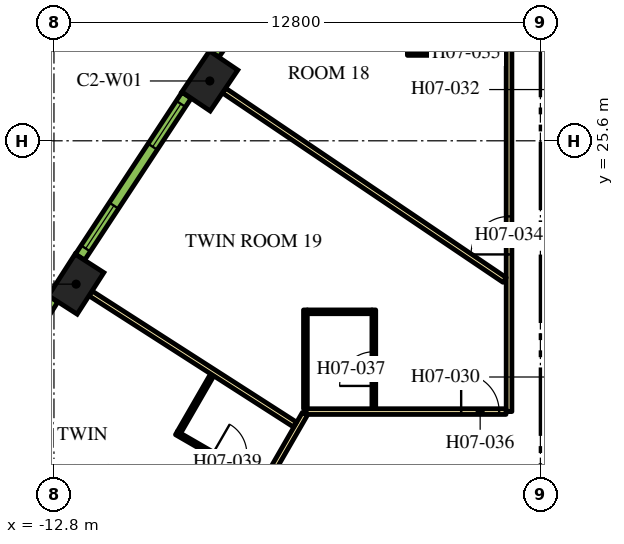
"""IFC4 building model, lengths in metres.
Left out: names, types, materials, properties, quantities, classifications, styles, units other than length and angle.
Written with IfcOpenShell. Run it as: python <this file> out.ifc"""

import sys

from ifc_helpers import new_model, si_unit, direction, frame, frame_2d, origin, origin_2d, place, context, subcontext, project, spatial, rectangle, extrude, element, fill, save


model = new_model("IFC4")
c1 = context("Model", 3, precision=1e-05, world=origin(), true_north=direction((0.0, 1.0)))
c2 = subcontext(c1, "Body", "Model", "MODEL_VIEW")
j1 = project(units=[si_unit("LENGTHUNIT", "METRE"), si_unit("PLANEANGLEUNIT", "RADIAN")], contexts=[c1])
p1 = place(None, origin())
s1 = spatial("IfcSite", under=j1, at=p1, CompositionType="ELEMENT")
p2 = place(p1, origin())
s2 = spatial("IfcBuilding", under=s1, at=p2, CompositionType="ELEMENT")
p3 = place(p2, frame((0.0, 0.0, 95.4)))
s3 = spatial("IfcBuildingStorey", under=s2, at=p3, CompositionType="ELEMENT", Elevation=95.4)
for number, where, z_axis, x_axis in (
    (1, (-8.699, 27.174, 0.0), (0.0, 0.0, 1.0), (-0.559, -0.829, 0.0)),
    (2, (-12.217, 21.828, 0.0), (0.0, 0.0, 1.0), (-0.54, -0.842, 0.0)),
):
    element("IfcColumn", number, at=place(p3, frame(where, z_axis=z_axis, x_axis=x_axis)), inside=s3, PredefinedType="COLUMN", context=c2, shape_type="SweptSolid", body=[
        extrude(rectangle(XDim=1.3, YDim=0.9, at=origin_2d()), origin(), (0.0, 0.0, 1.0), 3.9),
    ])
p4 = place(p3, frame((-0.825, 18.475, 0.0), z_axis=(0.0, 0.0, 1.0), x_axis=(0.0, 1.0, 0.0)))
e3 = element("IfcWall", 3, at=p4, inside=s3, PredefinedType="PARTITIONING", context=c2, shape_type="SweptSolid", body=[
    extrude(rectangle(XDim=13.623, YDim=0.15, at=frame_2d((6.812, 0.0))), origin(), (0.0, 0.0, 1.0), 2.75),
])
p5 = place(p4, frame((4.135, 0.0, 0.0)))
e4 = element("IfcOpeningElement", 4, at=p5, cuts=e3, PredefinedType="OPENING", context=c2, shape_type="SweptSolid", body=[
    extrude(rectangle(XDim=1.0, YDim=2.1, at=frame_2d((0.5, 1.05))), frame((0.0, 0.085, 0.0), z_axis=(0.0, -1.0, 0.0), x_axis=(1.0, 0.0, 0.0)), (0.0, 0.0, 1.0), 0.17),
])
p6 = place(p3, frame((-6.163, 18.475, 0.0), z_axis=(0.0, 0.0, 1.0), x_axis=(1.0, 0.0, 0.0)))
e5 = element("IfcWall", 5, at=p6, inside=s3, PredefinedType="PARTITIONING", context=c2, shape_type="SweptSolid", body=[
    extrude(rectangle(XDim=5.258, YDim=0.15, at=frame_2d((2.629, 0.0))), origin(), (0.0, 0.0, 1.0), 2.75),
])
p7 = place(p6, frame((4.078, 0.0, 0.0)))
e6 = element("IfcOpeningElement", 6, at=p7, cuts=e5, PredefinedType="OPENING", context=c2, shape_type="SweptSolid", body=[
    extrude(rectangle(XDim=1.0, YDim=2.1, at=frame_2d((0.5, 1.05))), frame((0.0, 0.085, 0.0), z_axis=(0.0, -1.0, 0.0), x_axis=(1.0, 0.0, 0.0)), (0.0, 0.0, 1.0), 0.17),
])
p8 = place(p3, frame((-19.081, -3.9, 0.0), z_axis=(0.0, 0.0, 1.0), x_axis=(0.499998313975, 0.866026377209, 0.0)))
e7 = element("IfcWall", 7, at=p8, inside=s3, PredefinedType="PARTITIONING", context=c2, shape_type="SweptSolid", body=[
    extrude(rectangle(XDim=25.766, YDim=0.15, at=frame_2d((12.883, 0.0))), origin(), (0.0, 0.0, 1.0), 2.75),
])
p9 = place(p8, frame((19.306, 0.0, 0.0)))
e8 = element("IfcOpeningElement", 8, at=p9, cuts=e7, PredefinedType="OPENING", context=c2, shape_type="SweptSolid", body=[
    extrude(rectangle(XDim=1.0, YDim=2.1, at=frame_2d((0.5, 1.05))), frame((0.0, 0.085, 0.0), z_axis=(0.0, -1.0, 0.0), x_axis=(1.0, 0.0, 0.0)), (0.0, 0.0, 1.0), 0.17),
])
p10 = place(p8, frame((17.144, 0.0, 0.0)))
e9 = element("IfcOpeningElement", 9, at=p10, cuts=e7, PredefinedType="OPENING", context=c2, shape_type="SweptSolid", body=[
    extrude(rectangle(XDim=0.9, YDim=2.1, at=frame_2d((0.45, 1.05))), frame((0.0, 0.085, 0.0), z_axis=(0.0, -1.0, 0.0), x_axis=(1.0, 0.0, 0.0)), (0.0, 0.0, 1.0), 0.17),
])
p11 = place(p8, frame((9.955, 0.0, 0.0)))
e10 = element("IfcOpeningElement", 10, at=p11, cuts=e7, PredefinedType="OPENING", context=c2, shape_type="SweptSolid", body=[
    extrude(rectangle(XDim=1.1, YDim=2.1, at=frame_2d((0.55, 1.05))), frame((0.0, 0.085, 0.0), z_axis=(0.0, -1.0, 0.0), x_axis=(1.0, 0.0, 0.0)), (0.0, 0.0, 1.0), 0.17),
])
p12 = place(p8, frame((8.648, 0.0, 0.0)))
e11 = element("IfcOpeningElement", 11, at=p12, cuts=e7, PredefinedType="OPENING", context=c2, shape_type="SweptSolid", body=[
    extrude(rectangle(XDim=1.0, YDim=2.1, at=frame_2d((0.5, 1.05))), frame((0.0, 0.085, 0.0), z_axis=(0.0, -1.0, 0.0), x_axis=(1.0, 0.0, 0.0)), (0.0, 0.0, 1.0), 0.17),
])
p13 = place(p8, frame((1.553, 0.0, 0.0)))
e12 = element("IfcOpeningElement", 12, at=p13, cuts=e7, PredefinedType="OPENING", context=c2, shape_type="SweptSolid", body=[
    extrude(rectangle(XDim=0.9, YDim=2.1, at=frame_2d((0.45, 1.05))), frame((0.0, 0.085, 0.0), z_axis=(0.0, -1.0, 0.0), x_axis=(1.0, 0.0, 0.0)), (0.0, 0.0, 1.0), 0.17),
])
p14 = place(p3, frame((-11.838, 21.585, 0.0), z_axis=(0.0, 0.0, 1.0), x_axis=(0.841699322813, -0.539946525108, 0.0)))
e13 = element("IfcWall", 13, at=p14, inside=s3, PredefinedType="PARTITIONING", context=c2, shape_type="SweptSolid", body=[
    extrude(rectangle(XDim=6.392, YDim=0.15, at=frame_2d((3.196, 0.0))), origin(), (0.0, 0.0, 1.0), 2.75),
])
p15 = place(p3, frame((-8.326, 26.923, 0.0), z_axis=(0.0, 0.0, 1.0), x_axis=(0.828836601893, -0.5594907393, 0.0)))
e14 = element("IfcWall", 14, at=p15, inside=s3, PredefinedType="PARTITIONING", context=c2, shape_type="SweptSolid", body=[
    extrude(rectangle(XDim=8.909, YDim=0.15, at=frame_2d((4.455, 0.0))), origin(), (0.0, 0.0, 1.0), 2.75),
])
p16 = place(p3, frame((-3.5, 27.898, 0.0), z_axis=(0.0, 0.0, 1.0), x_axis=(1.0, 0.0, 0.0)))
e15 = element("IfcWall", 15, at=p16, inside=s3, PredefinedType="PARTITIONING", context=c2, shape_type="SweptSolid", body=[
    extrude(rectangle(XDim=2.6, YDim=0.1, at=frame_2d((1.3, 0.0))), origin(), (0.0, 0.0, 1.0), 2.75),
])
p17 = place(p16, frame((1.1, 0.0, 0.0)))
e16 = element("IfcOpeningElement", 16, at=p17, cuts=e15, PredefinedType="OPENING", context=c2, shape_type="SweptSolid", body=[
    extrude(rectangle(XDim=0.9, YDim=2.1, at=frame_2d((0.45, 1.05))), frame((0.0, 0.06, 0.0), z_axis=(0.0, -1.0, 0.0), x_axis=(1.0, 0.0, 0.0)), (0.0, 0.0, 1.0), 0.12),
])
p18 = place(p3, frame((-4.383, 18.55, 0.0), z_axis=(0.0, 0.0, 1.0), x_axis=(0.0, 1.0, 0.0)))
e17 = element("IfcWall", 17, at=p18, inside=s3, PredefinedType="PARTITIONING", context=c2, shape_type="SweptSolid", body=[
    extrude(rectangle(XDim=2.6, YDim=0.1, at=frame_2d((1.3, 0.0))), origin(), (0.0, 0.0, 1.0), 2.75),
])
p19 = place(p18, frame((0.6, 0.0, 0.0)))
e18 = element("IfcOpeningElement", 18, at=p19, cuts=e17, PredefinedType="OPENING", context=c2, shape_type="SweptSolid", body=[
    extrude(rectangle(XDim=0.9, YDim=2.1, at=frame_2d((0.45, 1.05))), frame((0.0, 0.06, 0.0), z_axis=(0.0, -1.0, 0.0), x_axis=(1.0, 0.0, 0.0)), (0.0, 0.0, 1.0), 0.12),
])
p20 = place(p3, frame((-4.433, 21.1, 0.0), z_axis=(0.0, 0.0, 1.0), x_axis=(-1.0, 0.0, 0.0)))
e19 = element("IfcWall", 19, at=p20, inside=s3, PredefinedType="PARTITIONING", context=c2, shape_type="SweptSolid", body=[
    extrude(rectangle(XDim=1.7, YDim=0.1, at=frame_2d((0.85, 0.0))), origin(), (0.0, 0.0, 1.0), 2.75),
])
p21 = place(p3, frame((-6.183, 18.55, 0.0), z_axis=(0.0, 0.0, 1.0), x_axis=(0.0, 1.0, 0.0)))
e20 = element("IfcWall", 20, at=p21, inside=s3, PredefinedType="PARTITIONING", context=c2, shape_type="SweptSolid", body=[
    extrude(rectangle(XDim=2.6, YDim=0.1, at=frame_2d((1.3, 0.0))), origin(), (0.0, 0.0, 1.0), 2.75),
])
p22 = place(p3, frame((-9.578, 17.911, 0.0), z_axis=(0.0, 0.0, 1.0), x_axis=(0.866021400173, -0.500006934395, 0.0)))
e21 = element("IfcWall", 21, at=p22, inside=s3, PredefinedType="PARTITIONING", context=c2, shape_type="SweptSolid", body=[
    extrude(rectangle(XDim=2.6, YDim=0.1, at=frame_2d((1.3, 0.0))), origin(), (0.0, 0.0, 1.0), 2.75),
])
p23 = place(p22, frame((1.1, 0.0, 0.0)))
e22 = element("IfcOpeningElement", 22, at=p23, cuts=e21, PredefinedType="OPENING", context=c2, shape_type="SweptSolid", body=[
    extrude(rectangle(XDim=0.9, YDim=2.1, at=frame_2d((0.45, 1.05))), frame((0.0, 0.06, 0.0), z_axis=(0.0, -1.0, 0.0), x_axis=(1.0, 0.0, 0.0)), (0.0, 0.0, 1.0), 0.12),
])
p24 = place(p3, frame((-9.51, 17.929, 0.0), z_axis=(0.0, 0.0, 1.0), x_axis=(0.500062521093, 0.865989304205, 0.0)))
e23 = element("IfcWall", 23, at=p24, inside=s3, PredefinedType="PARTITIONING", context=c2, shape_type="SweptSolid", body=[
    extrude(rectangle(XDim=1.74, YDim=0.1, at=frame_2d((0.87, 0.0))), origin(), (0.0, 0.0, 1.0), 2.75),
])
p25 = place(p3, frame((-5.673, 32.081, 0.0), z_axis=(0.0, 0.0, 1.0), x_axis=(-0.569113019126, -0.822259309136, 0.0)))
e24 = element("IfcWall", 24, at=p25, inside=s3, PredefinedType="SOLIDWALL", context=c2, shape_type="SweptSolid", body=[
    extrude(rectangle(XDim=5.107, YDim=0.29, at=frame_2d((2.553, 0.0))), origin(), (0.0, 0.0, 1.0), 3.65),
])
p26 = place(p25, frame((0.24, 0.0, 0.9)))
e25 = element("IfcOpeningElement", 25, at=p26, cuts=e24, PredefinedType="OPENING", context=c2, shape_type="SweptSolid", body=[
    extrude(rectangle(XDim=1.35, YDim=2.15, at=frame_2d((0.675, 1.075))), frame((0.0, 0.155, 0.0), z_axis=(0.0, -1.0, 0.0), x_axis=(1.0, 0.0, 0.0)), (0.0, 0.0, 1.0), 0.31),
])
p27 = place(p25, frame((3.471, 0.0, 0.9)))
e26 = element("IfcOpeningElement", 26, at=p27, cuts=e24, PredefinedType="OPENING", context=c2, shape_type="SweptSolid", body=[
    extrude(rectangle(XDim=1.35, YDim=2.15, at=frame_2d((0.675, 1.075))), frame((0.0, 0.155, 0.0), z_axis=(0.0, -1.0, 0.0), x_axis=(1.0, 0.0, 0.0)), (0.0, 0.0, 1.0), 0.31),
])
p28 = place(p3, frame((-9.311, 26.799, 0.0), z_axis=(0.0, 0.0, 1.0), x_axis=(-0.549741341923, -0.835334937005, 0.0)))
e27 = element("IfcWall", 27, at=p28, inside=s3, PredefinedType="SOLIDWALL", context=c2, shape_type="SweptSolid", body=[
    extrude(rectangle(XDim=5.1, YDim=0.29, at=frame_2d((2.55, 0.0))), origin(), (0.0, 0.0, 1.0), 3.65),
])
p29 = place(p28, frame((0.273, 0.0, 0.9)))
e28 = element("IfcOpeningElement", 28, at=p29, cuts=e27, PredefinedType="OPENING", context=c2, shape_type="SweptSolid", body=[
    extrude(rectangle(XDim=1.35, YDim=2.15, at=frame_2d((0.675, 1.075))), frame((0.0, 0.155, 0.0), z_axis=(0.0, -1.0, 0.0), x_axis=(1.0, 0.0, 0.0)), (0.0, 0.0, 1.0), 0.31),
])
p30 = place(p28, frame((3.478, 0.0, 0.9)))
e29 = element("IfcOpeningElement", 29, at=p30, cuts=e27, PredefinedType="OPENING", context=c2, shape_type="SweptSolid", body=[
    extrude(rectangle(XDim=1.35, YDim=2.15, at=frame_2d((0.675, 1.075))), frame((0.0, 0.155, 0.0), z_axis=(0.0, -1.0, 0.0), x_axis=(1.0, 0.0, 0.0)), (0.0, 0.0, 1.0), 0.31),
])
p31 = place(p3, frame((-12.82, 21.439, 0.0), z_axis=(0.0, 0.0, 1.0), x_axis=(-0.530072082134, -0.847952585787, 0.0)))
e30 = element("IfcWall", 30, at=p31, inside=s3, PredefinedType="SOLIDWALL", context=c2, shape_type="SweptSolid", body=[
    extrude(rectangle(XDim=5.1, YDim=0.29, at=frame_2d((2.55, 0.0))), origin(), (0.0, 0.0, 1.0), 3.65),
])
p32 = place(p31, frame((0.273, 0.0, 0.9)))
e31 = element("IfcOpeningElement", 31, at=p32, cuts=e30, PredefinedType="OPENING", context=c2, shape_type="SweptSolid", body=[
    extrude(rectangle(XDim=1.35, YDim=2.15, at=frame_2d((0.675, 1.075))), frame((0.0, 0.155, 0.0), z_axis=(0.0, -1.0, 0.0), x_axis=(1.0, 0.0, 0.0)), (0.0, 0.0, 1.0), 0.31),
])
p33 = place(p31, frame((3.478, 0.0, 0.9)))
e32 = element("IfcOpeningElement", 32, at=p33, cuts=e30, PredefinedType="OPENING", context=c2, shape_type="SweptSolid", body=[
    extrude(rectangle(XDim=1.35, YDim=2.15, at=frame_2d((0.675, 1.075))), frame((0.0, 0.155, 0.0), z_axis=(0.0, -1.0, 0.0), x_axis=(1.0, 0.0, 0.0)), (0.0, 0.0, 1.0), 0.31),
])
p34 = place(p5, origin())
e33 = element("IfcDoor", 33, at=p34, inside=s3, OperationType="SINGLE_SWING_LEFT", PredefinedType="DOOR", context=c2, shape_type="SweptSolid", body=[
    extrude(rectangle(XDim=1.0, YDim=2.1, at=frame_2d((0.5, 1.05))), frame((0.0, 0.025, 0.0), z_axis=(0.0, -1.0, 0.0), x_axis=(1.0, 0.0, 0.0)), (0.0, 0.0, 1.0), 0.05),
])
fill(e4, e33)
p35 = place(p17, origin())
e34 = element("IfcDoor", 34, at=p35, inside=s3, OperationType="SINGLE_SWING_RIGHT", PredefinedType="DOOR", context=c2, shape_type="SweptSolid", body=[
    extrude(rectangle(XDim=0.9, YDim=2.1, at=frame_2d((0.45, 1.05))), frame((0.0, 0.025, 0.0), z_axis=(0.0, -1.0, 0.0), x_axis=(1.0, 0.0, 0.0)), (0.0, 0.0, 1.0), 0.05),
])
fill(e16, e34)
p36 = place(p7, origin())
e35 = element("IfcDoor", 35, at=p36, inside=s3, OperationType="SINGLE_SWING_RIGHT", PredefinedType="DOOR", context=c2, shape_type="SweptSolid", body=[
    extrude(rectangle(XDim=1.0, YDim=2.1, at=frame_2d((0.5, 1.05))), frame((0.0, 0.025, 0.0), z_axis=(0.0, -1.0, 0.0), x_axis=(1.0, 0.0, 0.0)), (0.0, 0.0, 1.0), 0.05),
])
fill(e6, e35)
p37 = place(p19, origin())
e36 = element("IfcDoor", 36, at=p37, inside=s3, OperationType="SINGLE_SWING_LEFT", PredefinedType="DOOR", context=c2, shape_type="SweptSolid", body=[
    extrude(rectangle(XDim=0.9, YDim=2.1, at=frame_2d((0.45, 1.05))), frame((0.0, 0.025, 0.0), z_axis=(0.0, -1.0, 0.0), x_axis=(1.0, 0.0, 0.0)), (0.0, 0.0, 1.0), 0.05),
])
fill(e18, e36)
p38 = place(p23, origin())
e37 = element("IfcDoor", 37, at=p38, inside=s3, OperationType="SINGLE_SWING_LEFT", PredefinedType="DOOR", context=c2, shape_type="SweptSolid", body=[
    extrude(rectangle(XDim=0.9, YDim=2.1, at=frame_2d((0.45, 1.05))), frame((0.0, 0.025, 0.0), z_axis=(0.0, -1.0, 0.0), x_axis=(1.0, 0.0, 0.0)), (0.0, 0.0, 1.0), 0.05),
])
fill(e22, e37)
p39 = place(p29, origin())
e38 = element("IfcWindow", 38, at=p39, inside=s3, PartitioningType="DOUBLE_PANEL_VERTICAL", PredefinedType="WINDOW", context=c2, shape_type="SweptSolid", body=[
    extrude(rectangle(XDim=1.35, YDim=2.15, at=frame_2d((0.675, 1.075))), frame((0.0, 0.015, 0.0), z_axis=(0.0, -1.0, 0.0), x_axis=(1.0, 0.0, 0.0)), (0.0, 0.0, 1.0), 0.06),
])
fill(e28, e38)
p40 = place(p30, origin())
e39 = element("IfcWindow", 39, at=p40, inside=s3, PartitioningType="DOUBLE_PANEL_VERTICAL", PredefinedType="WINDOW", context=c2, shape_type="SweptSolid", body=[
    extrude(rectangle(XDim=1.35, YDim=2.15, at=frame_2d((0.675, 1.075))), frame((0.0, 0.015, 0.0), z_axis=(0.0, -1.0, 0.0), x_axis=(1.0, 0.0, 0.0)), (0.0, 0.0, 1.0), 0.06),
])
fill(e29, e39)
save(model, sys.argv[1])
